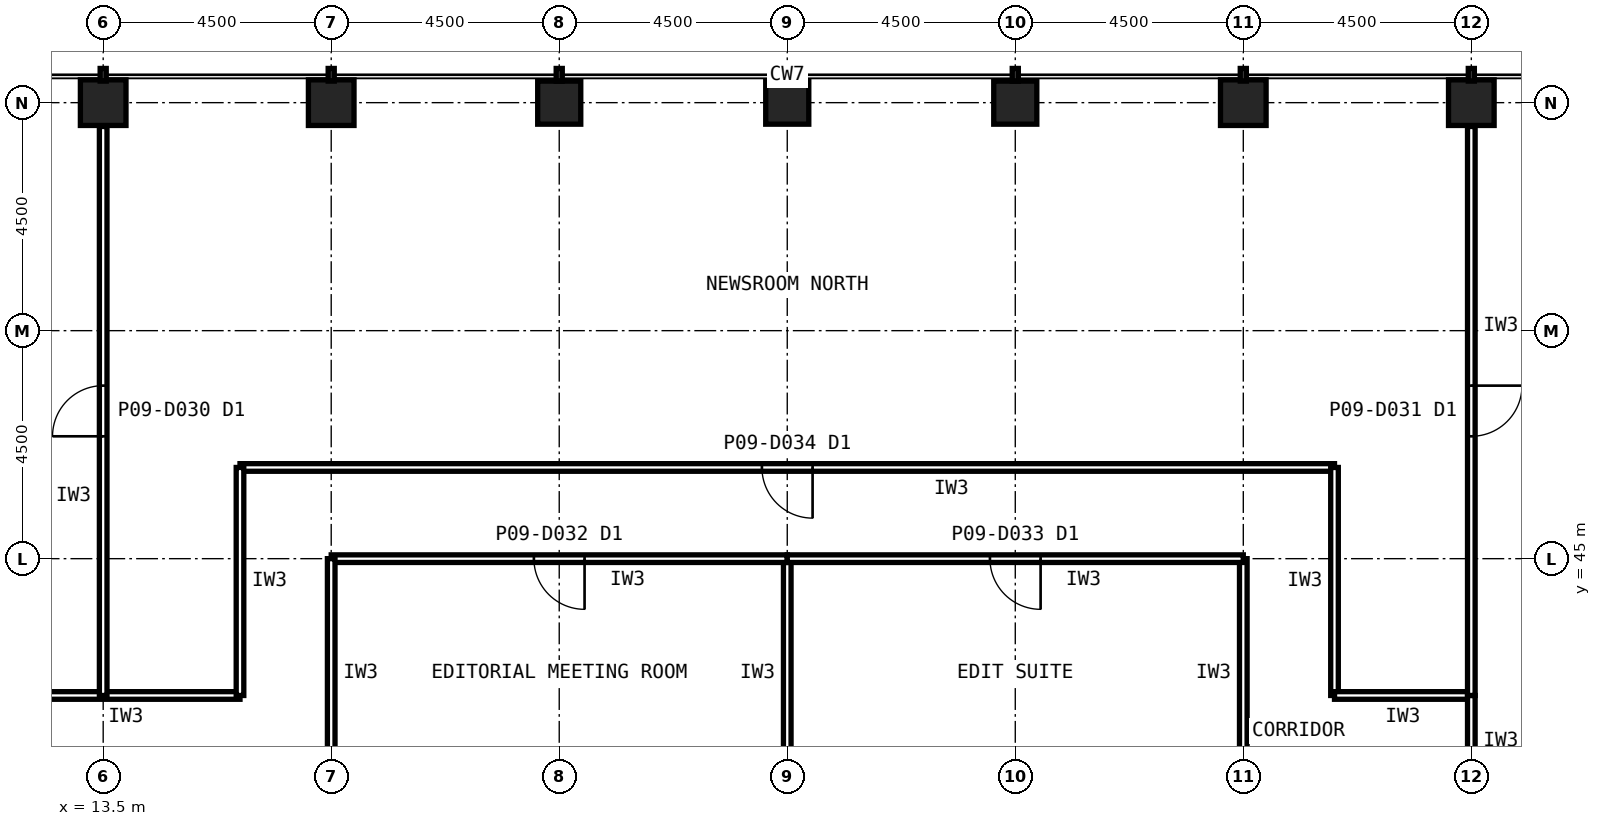
"""IFC4 building model, lengths in metres.
Left out: names, types, materials, properties, quantities, classifications, styles, units other than length and angle.
Written with IfcOpenShell. Run it as: python <this file> out.ifc"""

import sys

from ifc_helpers import new_model, si_unit, direction, frame, frame_2d, origin, origin_2d, place, context, subcontext, project, spatial, rectangle, hollow_rectangle, extrude, element, fill, save


model = new_model("IFC4")
c1 = context("Model", 3, precision=1e-05, world=origin(), true_north=direction((0.0, 1.0)))
c2 = subcontext(c1, "Body", "Model", "MODEL_VIEW")
j1 = project(units=[si_unit("LENGTHUNIT", "METRE"), si_unit("PLANEANGLEUNIT", "RADIAN")], contexts=[c1])
p1 = place(None, origin())
s1 = spatial("IfcSite", under=j1, at=p1, CompositionType="ELEMENT")
p2 = place(p1, origin())
s2 = spatial("IfcBuilding", under=s1, at=p2, CompositionType="ELEMENT")
p3 = place(p2, frame((0.0, 0.0, 41.6)))
s3 = spatial("IfcBuildingStorey", under=s2, at=p3, CompositionType="ELEMENT", Elevation=41.6)
for number, where, z_axis, x_axis in (
    (1, (40.5, 54.0, 0.0), (0.0, 0.0, 1.0), (1.0, 0.0, 0.0)),
    (2, (36.0, 54.0, 0.0), (0.0, 0.0, 1.0), (1.0, 0.0, 0.0)),
):
    element("IfcColumn", number, at=place(p3, frame(where, z_axis=z_axis, x_axis=x_axis)), inside=s3, PredefinedType="COLUMN", context=c2, shape_type="SweptSolid", body=[
        extrude(hollow_rectangle(XDim=0.9, YDim=0.9, WallThickness=0.063, at=origin_2d()), origin(), (0.0, 0.0, 1.0), 4.2),
    ])
for number, where, z_axis, x_axis in (
    (3, (31.5, 54.0, 0.0), (0.0, 0.0, 1.0), (1.0, 0.0, 0.0)),
    (4, (27.0, 54.0, 0.0), (0.0, 0.0, 1.0), (1.0, 0.0, 0.0)),
    (5, (22.5, 54.0, 0.0), (0.0, 0.0, 1.0), (1.0, 0.0, 0.0)),
):
    element("IfcColumn", number, at=place(p3, frame(where, z_axis=z_axis, x_axis=x_axis)), inside=s3, PredefinedType="COLUMN", context=c2, shape_type="SweptSolid", body=[
        extrude(hollow_rectangle(XDim=0.85, YDim=0.85, WallThickness=0.05, at=origin_2d()), origin(), (0.0, 0.0, 1.0), 4.2),
    ])
for number, where, z_axis, x_axis in (
    (6, (18.0, 54.0, 0.0), (0.0, 0.0, 1.0), (1.0, 0.0, 0.0)),
    (7, (13.5, 54.0, 0.0), (0.0, 0.0, 1.0), (1.0, 0.0, 0.0)),
):
    element("IfcColumn", number, at=place(p3, frame(where, z_axis=z_axis, x_axis=x_axis)), inside=s3, PredefinedType="COLUMN", context=c2, shape_type="SweptSolid", body=[
        extrude(hollow_rectangle(XDim=0.9, YDim=0.9, WallThickness=0.063, at=origin_2d()), origin(), (0.0, 0.0, 1.0), 4.2),
    ])
p4 = place(p3, frame((37.8, 46.8, 0.0), z_axis=(0.0, 0.0, 1.0), x_axis=(-1.0, 0.0, 0.0)))
e8 = element("IfcWall", 8, at=p4, inside=s3, PredefinedType="PARTITIONING", context=c2, shape_type="SweptSolid", body=[
    extrude(rectangle(XDim=21.6, YDim=0.15, at=frame_2d((10.8, 0.0))), origin(), (0.0, 0.0, 1.0), 4.04),
])
p5 = place(p4, frame((10.3, 0.0, 0.0)))
e9 = element("IfcOpeningElement", 9, at=p5, cuts=e8, PredefinedType="OPENING", context=c2, shape_type="SweptSolid", body=[
    extrude(rectangle(XDim=1.0, YDim=2.1, at=frame_2d((0.5, 1.05))), frame((0.0, 0.085, 0.0), z_axis=(0.0, -1.0, 0.0), x_axis=(1.0, 0.0, 0.0)), (0.0, 0.0, 1.0), 0.17),
])
for number, where, z_axis, x_axis in (
    (10, (16.2, 42.3, 0.0), (0.0, 0.0, 1.0), (-1.0, 0.0, 0.0)),
    (11, (16.2, 46.8, 0.0), (0.0, 0.0, 1.0), (0.0, -1.0, 0.0)),
    (12, (37.8, 42.3, 0.0), (0.0, 0.0, 1.0), (0.0, 1.0, 0.0)),
):
    element("IfcWall", number, at=place(p3, frame(where, z_axis=z_axis, x_axis=x_axis)), inside=s3, PredefinedType="PARTITIONING", context=c2, shape_type="SweptSolid", body=[
        extrude(rectangle(XDim=4.5, YDim=0.15, at=frame_2d((2.25, 0.0))), origin(), (0.0, 0.0, 1.0), 4.04),
    ])
p6 = place(p3, frame((40.5, 42.3, 0.0), z_axis=(0.0, 0.0, 1.0), x_axis=(-1.0, 0.0, 0.0)))
e13 = element("IfcWall", 13, at=p6, inside=s3, PredefinedType="PARTITIONING", context=c2, shape_type="SweptSolid", body=[
    extrude(rectangle(XDim=2.7, YDim=0.15, at=frame_2d((1.35, 0.0))), origin(), (0.0, 0.0, 1.0), 4.04),
])
p7 = place(p3, frame((40.5, 40.49, 0.0), z_axis=(0.0, 0.0, 1.0), x_axis=(0.0, 1.0, 0.0)))
e14 = element("IfcWall", 14, at=p7, inside=s3, PredefinedType="PARTITIONING", context=c2, shape_type="SweptSolid", body=[
    extrude(rectangle(XDim=1.81, YDim=0.15, at=frame_2d((0.905, 0.0))), origin(), (0.0, 0.0, 1.0), 3.189),
])
p8 = place(p3, frame((27.0, 40.5, 0.0), z_axis=(0.0, 0.0, 1.0), x_axis=(0.0, 1.0, 0.0)))
e15 = element("IfcWall", 15, at=p8, inside=s3, PredefinedType="PARTITIONING", context=c2, shape_type="SweptSolid", body=[
    extrude(rectangle(XDim=4.5, YDim=0.15, at=frame_2d((2.25, 0.0))), origin(), (0.0, 0.0, 1.0), 3.189),
])
p9 = place(p3, frame((27.0, 45.0, 0.0), z_axis=(0.0, 0.0, 1.0), x_axis=(-1.0, 0.0, 0.0)))
e16 = element("IfcWall", 16, at=p9, inside=s3, PredefinedType="PARTITIONING", context=c2, shape_type="SweptSolid", body=[
    extrude(rectangle(XDim=9.0, YDim=0.15, at=frame_2d((4.5, 0.0))), origin(), (0.0, 0.0, 1.0), 4.04),
])
p10 = place(p9, frame((4.0, 0.0, 0.0)))
e17 = element("IfcOpeningElement", 17, at=p10, cuts=e16, PredefinedType="OPENING", context=c2, shape_type="SweptSolid", body=[
    extrude(rectangle(XDim=1.0, YDim=2.1, at=frame_2d((0.5, 1.05))), frame((0.0, 0.085, 0.0), z_axis=(0.0, -1.0, 0.0), x_axis=(1.0, 0.0, 0.0)), (0.0, 0.0, 1.0), 0.17),
])
for number, where, z_axis, x_axis in (
    (18, (18.0, 45.0, 0.0), (0.0, 0.0, 1.0), (0.0, -1.0, 0.0)),
    (19, (36.0, 40.5, 0.0), (0.0, 0.0, 1.0), (0.0, 1.0, 0.0)),
):
    element("IfcWall", number, at=place(p3, frame(where, z_axis=z_axis, x_axis=x_axis)), inside=s3, PredefinedType="PARTITIONING", context=c2, shape_type="SweptSolid", body=[
        extrude(rectangle(XDim=4.5, YDim=0.15, at=frame_2d((2.25, 0.0))), origin(), (0.0, 0.0, 1.0), 3.189),
    ])
p11 = place(p3, frame((36.0, 45.0, 0.0), z_axis=(0.0, 0.0, 1.0), x_axis=(-1.0, 0.0, 0.0)))
e20 = element("IfcWall", 20, at=p11, inside=s3, PredefinedType="PARTITIONING", context=c2, shape_type="SweptSolid", body=[
    extrude(rectangle(XDim=9.0, YDim=0.15, at=frame_2d((4.5, 0.0))), origin(), (0.0, 0.0, 1.0), 4.04),
])
p12 = place(p11, frame((4.0, 0.0, 0.0)))
e21 = element("IfcOpeningElement", 21, at=p12, cuts=e20, PredefinedType="OPENING", context=c2, shape_type="SweptSolid", body=[
    extrude(rectangle(XDim=1.0, YDim=2.1, at=frame_2d((0.5, 1.05))), frame((0.0, 0.085, 0.0), z_axis=(0.0, -1.0, 0.0), x_axis=(1.0, 0.0, 0.0)), (0.0, 0.0, 1.0), 0.17),
])
p13 = place(p3, frame((40.5, 53.53, 0.0), z_axis=(0.0, 0.0, 1.0), x_axis=(0.0, -1.0, 0.0)))
e22 = element("IfcWall", 22, at=p13, inside=s3, PredefinedType="PARTITIONING", context=c2, shape_type="SweptSolid", body=[
    extrude(rectangle(XDim=11.23, YDim=0.15, at=frame_2d((5.615, 0.0))), origin(), (0.0, 0.0, 1.0), 3.189),
])
p14 = place(p13, frame((5.115, 0.0, 0.0)))
e23 = element("IfcOpeningElement", 23, at=p14, cuts=e22, PredefinedType="OPENING", context=c2, shape_type="SweptSolid", body=[
    extrude(rectangle(XDim=1.0, YDim=2.1, at=frame_2d((0.5, 1.05))), frame((0.0, 0.085, 0.0), z_axis=(0.0, -1.0, 0.0), x_axis=(1.0, 0.0, 0.0)), (0.0, 0.0, 1.0), 0.17),
])
p15 = place(p3, frame((13.5, 42.3, 0.0), z_axis=(0.0, 0.0, 1.0), x_axis=(0.0, 1.0, 0.0)))
e24 = element("IfcWall", 24, at=p15, inside=s3, PredefinedType="PARTITIONING", context=c2, shape_type="SweptSolid", body=[
    extrude(rectangle(XDim=11.23, YDim=0.15, at=frame_2d((5.615, 0.0))), origin(), (0.0, 0.0, 1.0), 3.189),
])
p16 = place(p15, frame((5.115, 0.0, 0.0)))
e25 = element("IfcOpeningElement", 25, at=p16, cuts=e24, PredefinedType="OPENING", context=c2, shape_type="SweptSolid", body=[
    extrude(rectangle(XDim=1.0, YDim=2.1, at=frame_2d((0.5, 1.05))), frame((0.0, 0.085, 0.0), z_axis=(0.0, -1.0, 0.0), x_axis=(1.0, 0.0, 0.0)), (0.0, 0.0, 1.0), 0.17),
])
p17 = place(p5, origin())
e26 = element("IfcDoor", 26, at=p17, inside=s3, OperationType="SINGLE_SWING_LEFT", PredefinedType="DOOR", context=c2, shape_type="SweptSolid", body=[
    extrude(rectangle(XDim=1.0, YDim=2.1, at=frame_2d((0.5, 1.05))), frame((0.0, 0.025, 0.0), z_axis=(0.0, -1.0, 0.0), x_axis=(1.0, 0.0, 0.0)), (0.0, 0.0, 1.0), 0.05),
])
fill(e9, e26)
p18 = place(p10, origin())
e27 = element("IfcDoor", 27, at=p18, inside=s3, OperationType="SINGLE_SWING_LEFT", PredefinedType="DOOR", context=c2, shape_type="SweptSolid", body=[
    extrude(rectangle(XDim=1.0, YDim=2.1, at=frame_2d((0.5, 1.05))), frame((0.0, 0.025, 0.0), z_axis=(0.0, -1.0, 0.0), x_axis=(1.0, 0.0, 0.0)), (0.0, 0.0, 1.0), 0.05),
])
fill(e17, e27)
p19 = place(p12, origin())
e28 = element("IfcDoor", 28, at=p19, inside=s3, OperationType="SINGLE_SWING_LEFT", PredefinedType="DOOR", context=c2, shape_type="SweptSolid", body=[
    extrude(rectangle(XDim=1.0, YDim=2.1, at=frame_2d((0.5, 1.05))), frame((0.0, 0.025, 0.0), z_axis=(0.0, -1.0, 0.0), x_axis=(1.0, 0.0, 0.0)), (0.0, 0.0, 1.0), 0.05),
])
fill(e21, e28)
p20 = place(p14, origin())
e29 = element("IfcDoor", 29, at=p20, inside=s3, OperationType="SINGLE_SWING_LEFT", PredefinedType="DOOR", context=c2, shape_type="SweptSolid", body=[
    extrude(rectangle(XDim=1.0, YDim=2.1, at=frame_2d((0.5, 1.05))), frame((0.0, 0.025, 0.0), z_axis=(0.0, -1.0, 0.0), x_axis=(1.0, 0.0, 0.0)), (0.0, 0.0, 1.0), 0.05),
])
fill(e23, e29)
p21 = place(p16, origin())
e30 = element("IfcDoor", 30, at=p21, inside=s3, OperationType="SINGLE_SWING_LEFT", PredefinedType="DOOR", context=c2, shape_type="SweptSolid", body=[
    extrude(rectangle(XDim=1.0, YDim=2.1, at=frame_2d((0.5, 1.05))), frame((0.0, 0.025, 0.0), z_axis=(0.0, -1.0, 0.0), x_axis=(1.0, 0.0, 0.0)), (0.0, 0.0, 1.0), 0.05),
])
fill(e25, e30)
save(model, sys.argv[1])
